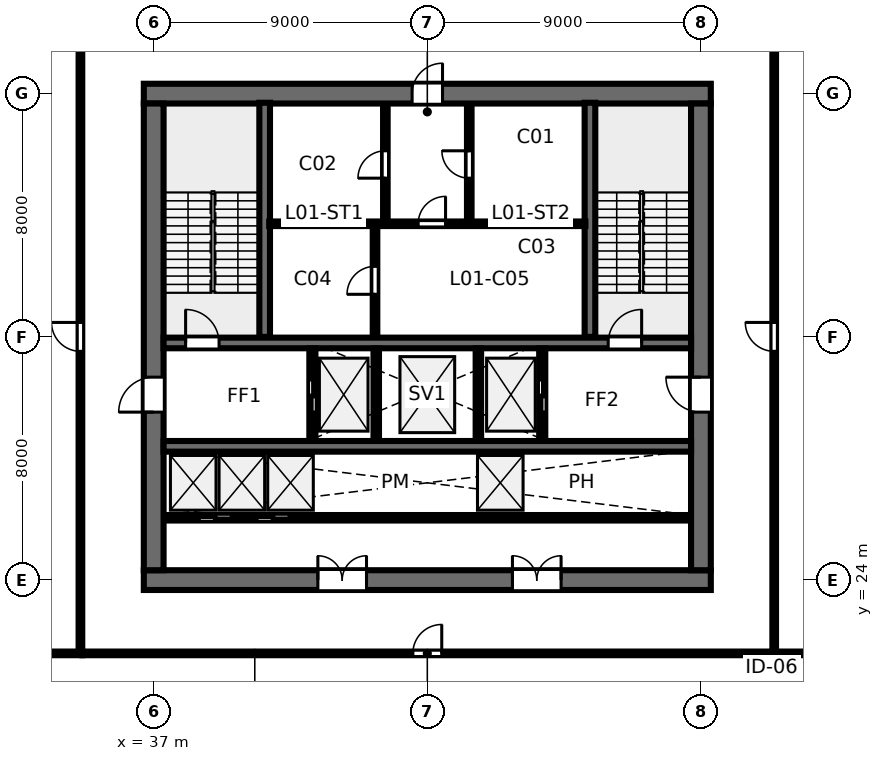
"""IFC4 building model, lengths in metres.
Left out: names, types, materials, properties, quantities, classifications, styles, units other than length and angle.
Written with IfcOpenShell. Run it as: python <this file> out.ifc"""

import sys

from ifc_helpers import new_model, si_unit, direction, frame, frame_2d, origin, place, context, subcontext, project, spatial, rectangle, extrude, element, fill, save


model = new_model("IFC4")
c1 = context("Model", 3, precision=1e-05, world=origin(), true_north=direction((0.0, 1.0)))
c2 = subcontext(c1, "Body", "Model", "MODEL_VIEW")
j1 = project(units=[si_unit("LENGTHUNIT", "METRE"), si_unit("PLANEANGLEUNIT", "RADIAN")], contexts=[c1])
p1 = place(None, origin())
s1 = spatial("IfcSite", under=j1, at=p1, CompositionType="ELEMENT")
p2 = place(p1, origin())
s2 = spatial("IfcBuilding", under=s1, at=p2, CompositionType="ELEMENT")
p3 = place(p2, frame((0.0, 0.0, 5.0)))
s3 = spatial("IfcBuildingStorey", under=s2, at=p3, CompositionType="ELEMENT", Elevation=5.0)
p4 = place(p3, frame((36.675, 24.0, 0.0), z_axis=(0.0, 0.0, 1.0), x_axis=(1.0, 0.0, 0.0)))
e1 = element("IfcWall", 1, at=p4, inside=s3, PredefinedType="SHEAR", context=c2, shape_type="SweptSolid", body=[
    extrude(rectangle(XDim=18.65, YDim=0.65, at=frame_2d((9.325, 0.0))), origin(), (0.0, 0.0, 1.0), 4.22),
])
p5 = place(p4, frame((5.725, 0.0, 0.0)))
e2 = element("IfcOpeningElement", 2, at=p5, cuts=e1, PredefinedType="OPENING", context=c2, shape_type="SweptSolid", body=[
    extrude(rectangle(XDim=1.6, YDim=2.15, at=frame_2d((0.8, 1.075))), frame((0.0, 0.335, 0.0), z_axis=(0.0, -1.0, 0.0), x_axis=(1.0, 0.0, 0.0)), (0.0, 0.0, 1.0), 0.67),
])
p6 = place(p4, frame((12.125, 0.0, 0.0)))
e3 = element("IfcOpeningElement", 3, at=p6, cuts=e1, PredefinedType="OPENING", context=c2, shape_type="SweptSolid", body=[
    extrude(rectangle(XDim=1.6, YDim=2.15, at=frame_2d((0.8, 1.075))), frame((0.0, 0.335, 0.0), z_axis=(0.0, -1.0, 0.0), x_axis=(1.0, 0.0, 0.0)), (0.0, 0.0, 1.0), 0.67),
])
p7 = place(p3, frame((36.675, 40.0, 0.0), z_axis=(0.0, 0.0, 1.0), x_axis=(1.0, 0.0, 0.0)))
e4 = element("IfcWall", 4, at=p7, inside=s3, PredefinedType="SHEAR", context=c2, shape_type="SweptSolid", body=[
    extrude(rectangle(XDim=18.65, YDim=0.65, at=frame_2d((9.325, 0.0))), origin(), (0.0, 0.0, 1.0), 4.22),
])
p8 = place(p7, frame((8.825, 0.0, 0.0)))
e5 = element("IfcOpeningElement", 5, at=p8, cuts=e4, PredefinedType="OPENING", context=c2, shape_type="SweptSolid", body=[
    extrude(rectangle(XDim=1.0, YDim=2.15, at=frame_2d((0.5, 1.075))), frame((0.0, 0.335, 0.0), z_axis=(0.0, -1.0, 0.0), x_axis=(1.0, 0.0, 0.0)), (0.0, 0.0, 1.0), 0.67),
])
p9 = place(p3, frame((37.0, 24.325, 0.0), z_axis=(0.0, 0.0, 1.0), x_axis=(0.0, 1.0, 0.0)))
e6 = element("IfcWall", 6, at=p9, inside=s3, PredefinedType="SHEAR", context=c2, shape_type="SweptSolid", body=[
    extrude(rectangle(XDim=15.35, YDim=0.65, at=frame_2d((7.675, 0.0))), origin(), (0.0, 0.0, 1.0), 4.22),
])
p10 = place(p9, frame((5.2, 0.0, 0.0)))
e7 = element("IfcOpeningElement", 7, at=p10, cuts=e6, PredefinedType="OPENING", context=c2, shape_type="SweptSolid", body=[
    extrude(rectangle(XDim=1.15, YDim=2.15, at=frame_2d((0.575, 1.075))), frame((0.0, 0.335, 0.0), z_axis=(0.0, -1.0, 0.0), x_axis=(1.0, 0.0, 0.0)), (0.0, 0.0, 1.0), 0.67),
])
p11 = place(p3, frame((55.0, 24.325, 0.0), z_axis=(0.0, 0.0, 1.0), x_axis=(0.0, 1.0, 0.0)))
e8 = element("IfcWall", 8, at=p11, inside=s3, PredefinedType="SHEAR", context=c2, shape_type="SweptSolid", body=[
    extrude(rectangle(XDim=15.35, YDim=0.65, at=frame_2d((7.675, 0.0))), origin(), (0.0, 0.0, 1.0), 4.22),
])
p12 = place(p11, frame((5.2, 0.0, 0.0)))
e9 = element("IfcOpeningElement", 9, at=p12, cuts=e8, PredefinedType="OPENING", context=c2, shape_type="SweptSolid", body=[
    extrude(rectangle(XDim=1.15, YDim=2.15, at=frame_2d((0.575, 1.075))), frame((0.0, 0.335, 0.0), z_axis=(0.0, -1.0, 0.0), x_axis=(1.0, 0.0, 0.0)), (0.0, 0.0, 1.0), 0.67),
])
p13 = place(p3, frame((37.325, 31.8, 0.0), z_axis=(0.0, 0.0, 1.0), x_axis=(1.0, 0.0, 0.0)))
e10 = element("IfcWall", 10, at=p13, inside=s3, PredefinedType="SHEAR", context=c2, shape_type="SweptSolid", body=[
    extrude(rectangle(XDim=17.35, YDim=0.35, at=frame_2d((8.675, 0.0))), origin(), (0.0, 0.0, 1.0), 4.22),
])
p14 = place(p13, frame((0.725, 0.0, 0.0)))
e11 = element("IfcOpeningElement", 11, at=p14, cuts=e10, PredefinedType="OPENING", context=c2, shape_type="SweptSolid", body=[
    extrude(rectangle(XDim=1.1, YDim=2.15, at=frame_2d((0.55, 1.075))), frame((0.0, 0.185, 0.0), z_axis=(0.0, -1.0, 0.0), x_axis=(1.0, 0.0, 0.0)), (0.0, 0.0, 1.0), 0.37),
])
p15 = place(p13, frame((14.625, 0.0, 0.0)))
e12 = element("IfcOpeningElement", 12, at=p15, cuts=e10, PredefinedType="OPENING", context=c2, shape_type="SweptSolid", body=[
    extrude(rectangle(XDim=1.1, YDim=2.15, at=frame_2d((0.55, 1.075))), frame((0.0, 0.185, 0.0), z_axis=(0.0, -1.0, 0.0), x_axis=(1.0, 0.0, 0.0)), (0.0, 0.0, 1.0), 0.37),
])
p16 = place(p3, frame((37.325, 28.4, 0.0), z_axis=(0.0, 0.0, 1.0), x_axis=(1.0, 0.0, 0.0)))
e13 = element("IfcWall", 13, at=p16, inside=s3, PredefinedType="SHEAR", context=c2, shape_type="SweptSolid", body=[
    extrude(rectangle(XDim=17.35, YDim=0.35, at=frame_2d((8.675, 0.0))), origin(), (0.0, 0.0, 1.0), 4.22),
])
for number, where, z_axis, x_axis in (
    (14, (40.65, 32.0, 0.0), (0.0, 0.0, 1.0), (0.0, 1.0, 0.0)),
    (15, (51.35, 32.0, 0.0), (0.0, 0.0, 1.0), (0.0, 1.0, 0.0)),
):
    element("IfcWall", number, at=place(p3, frame(where, z_axis=z_axis, x_axis=x_axis)), inside=s3, PredefinedType="SHEAR", context=c2, shape_type="SweptSolid", body=[
        extrude(rectangle(XDim=7.7, YDim=0.35, at=frame_2d((3.85, 0.0))), origin(), (0.0, 0.0, 1.0), 4.5),
    ])
p17 = place(p3, frame((44.62, 35.72, 0.0), z_axis=(0.0, 0.0, 1.0), x_axis=(0.0, 1.0, 0.0)))
e16 = element("IfcWall", 16, at=p17, inside=s3, PredefinedType="PARTITIONING", context=c2, shape_type="SweptSolid", body=[
    extrude(rectangle(XDim=3.93, YDim=0.15, at=frame_2d((1.965, 0.0))), origin(), (0.0, 0.0, 1.0), 4.22),
])
p18 = place(p17, frame((1.5, 0.0, 0.0)))
e17 = element("IfcOpeningElement", 17, at=p18, cuts=e16, PredefinedType="OPENING", context=c2, shape_type="SweptSolid", body=[
    extrude(rectangle(XDim=0.9, YDim=2.15, at=frame_2d((0.45, 1.075))), frame((0.0, 0.085, 0.0), z_axis=(0.0, -1.0, 0.0), x_axis=(1.0, 0.0, 0.0)), (0.0, 0.0, 1.0), 0.17),
])
p19 = place(p3, frame((47.38, 35.72, 0.0), z_axis=(0.0, 0.0, 1.0), x_axis=(0.0, 1.0, 0.0)))
e18 = element("IfcWall", 18, at=p19, inside=s3, PredefinedType="PARTITIONING", context=c2, shape_type="SweptSolid", body=[
    extrude(rectangle(XDim=3.93, YDim=0.15, at=frame_2d((1.965, 0.0))), origin(), (0.0, 0.0, 1.0), 4.22),
])
p20 = place(p19, frame((1.5, 0.0, 0.0)))
e19 = element("IfcOpeningElement", 19, at=p20, cuts=e18, PredefinedType="OPENING", context=c2, shape_type="SweptSolid", body=[
    extrude(rectangle(XDim=0.9, YDim=2.15, at=frame_2d((0.45, 1.075))), frame((0.0, 0.085, 0.0), z_axis=(0.0, -1.0, 0.0), x_axis=(1.0, 0.0, 0.0)), (0.0, 0.0, 1.0), 0.17),
])
p21 = place(p3, frame((44.28, 32.05, 0.0), z_axis=(0.0, 0.0, 1.0), x_axis=(0.0, 1.0, 0.0)))
e20 = element("IfcWall", 20, at=p21, inside=s3, PredefinedType="PARTITIONING", context=c2, shape_type="SweptSolid", body=[
    extrude(rectangle(XDim=3.67, YDim=0.15, at=frame_2d((1.835, 0.0))), origin(), (0.0, 0.0, 1.0), 4.22),
])
p22 = place(p21, frame((1.35, 0.0, 0.0)))
e21 = element("IfcOpeningElement", 21, at=p22, cuts=e20, PredefinedType="OPENING", context=c2, shape_type="SweptSolid", body=[
    extrude(rectangle(XDim=0.92, YDim=2.15, at=frame_2d((0.46, 1.075))), frame((0.0, 0.085, 0.0), z_axis=(0.0, -1.0, 0.0), x_axis=(1.0, 0.0, 0.0)), (0.0, 0.0, 1.0), 0.17),
])
p23 = place(p3, frame((40.8, 35.72, 0.0), z_axis=(0.0, 0.0, 1.0), x_axis=(1.0, 0.0, 0.0)))
e22 = element("IfcWall", 22, at=p23, inside=s3, PredefinedType="PARTITIONING", context=c2, shape_type="SweptSolid", body=[
    extrude(rectangle(XDim=10.4, YDim=0.15, at=frame_2d((5.2, 0.0))), origin(), (0.0, 0.0, 1.0), 4.22),
])
p24 = place(p23, frame((4.9, 0.0, 0.0)))
e23 = element("IfcOpeningElement", 23, at=p24, cuts=e22, PredefinedType="OPENING", context=c2, shape_type="SweptSolid", body=[
    extrude(rectangle(XDim=0.9, YDim=2.15, at=frame_2d((0.45, 1.075))), frame((0.0, 0.085, 0.0), z_axis=(0.0, -1.0, 0.0), x_axis=(1.0, 0.0, 0.0)), (0.0, 0.0, 1.0), 0.17),
])
p25 = place(p3, frame((42.22, 28.58, 0.0), z_axis=(0.0, 0.0, 1.0), x_axis=(0.0, 1.0, 0.0)))
e24 = element("IfcWall", 24, at=p25, inside=s3, PredefinedType="PARTITIONING", context=c2, shape_type="SweptSolid", body=[
    extrude(rectangle(XDim=3.04, YDim=0.2, at=frame_2d((1.52, 0.0))), origin(), (0.0, 0.0, 1.0), 4.22),
])
p26 = place(p25, frame((0.95, 0.0, 0.0)))
e25 = element("IfcOpeningElement", 25, at=p26, cuts=e24, PredefinedType="OPENING", context=c2, shape_type="SweptSolid", body=[
    extrude(rectangle(XDim=1.05, YDim=2.15, at=frame_2d((0.525, 1.075))), frame((0.0, 0.11, 0.0), z_axis=(0.0, -1.0, 0.0), x_axis=(1.0, 0.0, 0.0)), (0.0, 0.0, 1.0), 0.22),
])
p27 = place(p3, frame((49.78, 28.58, 0.0), z_axis=(0.0, 0.0, 1.0), x_axis=(0.0, 1.0, 0.0)))
e26 = element("IfcWall", 26, at=p27, inside=s3, PredefinedType="PARTITIONING", context=c2, shape_type="SweptSolid", body=[
    extrude(rectangle(XDim=3.04, YDim=0.2, at=frame_2d((1.52, 0.0))), origin(), (0.0, 0.0, 1.0), 4.22),
])
p28 = place(p27, frame((0.95, 0.0, 0.0)))
e27 = element("IfcOpeningElement", 27, at=p28, cuts=e26, PredefinedType="OPENING", context=c2, shape_type="SweptSolid", body=[
    extrude(rectangle(XDim=1.05, YDim=2.15, at=frame_2d((0.525, 1.075))), frame((0.0, 0.11, 0.0), z_axis=(0.0, -1.0, 0.0), x_axis=(1.0, 0.0, 0.0)), (0.0, 0.0, 1.0), 0.22),
])
for number, where, z_axis, x_axis in (
    (28, (44.32, 28.58, 0.0), (0.0, 0.0, 1.0), (0.0, 1.0, 0.0)),
    (29, (47.68, 28.58, 0.0), (0.0, 0.0, 1.0), (0.0, 1.0, 0.0)),
):
    element("IfcWall", number, at=place(p3, frame(where, z_axis=z_axis, x_axis=x_axis)), inside=s3, PredefinedType="PARTITIONING", context=c2, shape_type="SweptSolid", body=[
        extrude(rectangle(XDim=3.04, YDim=0.18, at=frame_2d((1.52, 0.0))), origin(), (0.0, 0.0, 1.0), 4.22),
    ])
p29 = place(p3, frame((37.4, 26.05, 0.0), z_axis=(0.0, 0.0, 1.0), x_axis=(1.0, 0.0, 0.0)))
e30 = element("IfcWall", 30, at=p29, inside=s3, PredefinedType="PARTITIONING", context=c2, shape_type="SweptSolid", body=[
    extrude(rectangle(XDim=17.2, YDim=0.18, at=frame_2d((8.6, 0.0))), origin(), (0.0, 0.0, 1.0), 4.22),
])
p30 = place(p29, frame((1.1, 0.0, 0.0)))
e31 = element("IfcOpeningElement", 31, at=p30, cuts=e30, PredefinedType="OPENING", context=c2, shape_type="SweptSolid", body=[
    extrude(rectangle(XDim=1.05, YDim=2.15, at=frame_2d((0.525, 1.075))), frame((0.0, 0.1, 0.0), z_axis=(0.0, -1.0, 0.0), x_axis=(1.0, 0.0, 0.0)), (0.0, 0.0, 1.0), 0.2),
])
p31 = place(p29, frame((3.0, 0.0, 0.0)))
e32 = element("IfcOpeningElement", 32, at=p31, cuts=e30, PredefinedType="OPENING", context=c2, shape_type="SweptSolid", body=[
    extrude(rectangle(XDim=1.05, YDim=2.15, at=frame_2d((0.525, 1.075))), frame((0.0, 0.1, 0.0), z_axis=(0.0, -1.0, 0.0), x_axis=(1.0, 0.0, 0.0)), (0.0, 0.0, 1.0), 0.2),
])
p32 = place(p3, frame((57.326, 21.59, 0.0), z_axis=(0.0, 0.0, 1.0), x_axis=(0.0, -1.0, 0.0)))
e33 = element("IfcWall", 33, at=p32, inside=s3, PredefinedType="MOVABLE", context=c2, shape_type="SweptSolid", body=[
    extrude(rectangle(XDim=17.25, YDim=0.12, at=frame_2d((8.625, 0.0))), origin(), (0.0, 0.0, 1.0), 3.32),
])
p33 = place(p32, frame((1.4, 0.0, 0.0)))
e34 = element("IfcOpeningElement", 34, at=p33, cuts=e33, PredefinedType="OPENING", context=c2, shape_type="SweptSolid", body=[
    extrude(rectangle(XDim=0.9, YDim=2.15, at=frame_2d((0.45, 1.075))), frame((0.0, 0.07, 0.0), z_axis=(0.0, -1.0, 0.0), x_axis=(1.0, 0.0, 0.0)), (0.0, 0.0, 1.0), 0.14),
])
p34 = place(p3, frame((34.65, 21.59, 0.0), z_axis=(0.0, 0.0, 1.0), x_axis=(1.0, 0.0, 0.0)))
e35 = element("IfcWall", 35, at=p34, inside=s3, PredefinedType="PARTITIONING", context=c2, shape_type="SweptSolid", body=[
    extrude(rectangle(XDim=22.7, YDim=0.12, at=frame_2d((11.35, 0.0))), origin(), (0.0, 0.0, 1.0), 3.32),
])
p35 = place(p34, frame((10.875, 0.0, 0.0)))
e36 = element("IfcOpeningElement", 36, at=p35, cuts=e35, PredefinedType="OPENING", context=c2, shape_type="SweptSolid", body=[
    extrude(rectangle(XDim=0.95, YDim=2.15, at=frame_2d((0.475, 1.075))), frame((0.0, 0.07, 0.0), z_axis=(0.0, -1.0, 0.0), x_axis=(1.0, 0.0, 0.0)), (0.0, 0.0, 1.0), 0.14),
])
p36 = place(p3, frame((34.59, 21.65, 0.0), z_axis=(0.0, 0.0, 1.0), x_axis=(0.0, 1.0, 0.0)))
e37 = element("IfcWall", 37, at=p36, inside=s3, PredefinedType="PARTITIONING", context=c2, shape_type="SweptSolid", body=[
    extrude(rectangle(XDim=20.7, YDim=0.12, at=frame_2d((10.35, 0.0))), origin(), (0.0, 0.0, 1.0), 3.32),
])
p37 = place(p36, frame((9.875, 0.0, 0.0)))
e38 = element("IfcOpeningElement", 38, at=p37, cuts=e37, PredefinedType="OPENING", context=c2, shape_type="SweptSolid", body=[
    extrude(rectangle(XDim=0.95, YDim=2.15, at=frame_2d((0.475, 1.075))), frame((0.0, 0.07, 0.0), z_axis=(0.0, -1.0, 0.0), x_axis=(1.0, 0.0, 0.0)), (0.0, 0.0, 1.0), 0.14),
])
p38 = place(p3, frame((57.41, 21.65, 0.0), z_axis=(0.0, 0.0, 1.0), x_axis=(0.0, 1.0, 0.0)))
e39 = element("IfcWall", 39, at=p38, inside=s3, PredefinedType="PARTITIONING", context=c2, shape_type="SweptSolid", body=[
    extrude(rectangle(XDim=20.7, YDim=0.12, at=frame_2d((10.35, 0.0))), origin(), (0.0, 0.0, 1.0), 3.32),
])
p39 = place(p38, frame((9.875, 0.0, 0.0)))
e40 = element("IfcOpeningElement", 40, at=p39, cuts=e39, PredefinedType="OPENING", context=c2, shape_type="SweptSolid", body=[
    extrude(rectangle(XDim=0.95, YDim=2.15, at=frame_2d((0.475, 1.075))), frame((0.0, 0.07, 0.0), z_axis=(0.0, -1.0, 0.0), x_axis=(1.0, 0.0, 0.0)), (0.0, 0.0, 1.0), 0.14),
])
for number, where, z_axis, x_axis in (
    (41, (34.65, 21.59, 0.0), (0.0, 0.0, 1.0), (-1.0, 0.0, 0.0)),
    (42, (57.35, 21.59, 0.0), (0.0, 0.0, 1.0), (1.0, 0.0, 0.0)),
):
    element("IfcWall", number, at=place(p3, frame(where, z_axis=z_axis, x_axis=x_axis)), inside=s3, PredefinedType="PARTITIONING", context=c2, shape_type="SweptSolid", body=[
        extrude(rectangle(XDim=29.01, YDim=0.12, at=frame_2d((14.505, 0.0))), origin(), (0.0, 0.0, 1.0), 3.32),
    ])
p40 = place(p14, origin())
e43 = element("IfcDoor", 43, at=p40, inside=s3, OperationType="SINGLE_SWING_LEFT", PredefinedType="DOOR", context=c2, shape_type="SweptSolid", body=[
    extrude(rectangle(XDim=1.1, YDim=2.15, at=frame_2d((0.55, 1.075))), frame((0.0, 0.025, 0.0), z_axis=(0.0, -1.0, 0.0), x_axis=(1.0, 0.0, 0.0)), (0.0, 0.0, 1.0), 0.05),
])
fill(e11, e43)
p41 = place(p15, origin())
e44 = element("IfcDoor", 44, at=p41, inside=s3, OperationType="SINGLE_SWING_RIGHT", PredefinedType="DOOR", context=c2, shape_type="SweptSolid", body=[
    extrude(rectangle(XDim=1.1, YDim=2.15, at=frame_2d((0.55, 1.075))), frame((0.0, 0.025, 0.0), z_axis=(0.0, -1.0, 0.0), x_axis=(1.0, 0.0, 0.0)), (0.0, 0.0, 1.0), 0.05),
])
fill(e12, e44)
p42 = place(p8, origin())
e45 = element("IfcDoor", 45, at=p42, inside=s3, OperationType="SINGLE_SWING_RIGHT", PredefinedType="DOOR", context=c2, shape_type="SweptSolid", body=[
    extrude(rectangle(XDim=1.0, YDim=2.15, at=frame_2d((0.5, 1.075))), frame((0.0, 0.025, 0.0), z_axis=(0.0, -1.0, 0.0), x_axis=(1.0, 0.0, 0.0)), (0.0, 0.0, 1.0), 0.05),
])
fill(e5, e45)
p43 = place(p10, origin())
e46 = element("IfcDoor", 46, at=p43, inside=s3, OperationType="SINGLE_SWING_LEFT", PredefinedType="DOOR", context=c2, shape_type="SweptSolid", body=[
    extrude(rectangle(XDim=1.15, YDim=2.15, at=frame_2d((0.575, 1.075))), frame((0.0, 0.025, 0.0), z_axis=(0.0, -1.0, 0.0), x_axis=(1.0, 0.0, 0.0)), (0.0, 0.0, 1.0), 0.05),
])
fill(e7, e46)
p44 = place(p12, origin())
e47 = element("IfcDoor", 47, at=p44, inside=s3, OperationType="SINGLE_SWING_RIGHT", PredefinedType="DOOR", context=c2, shape_type="SweptSolid", body=[
    extrude(rectangle(XDim=1.15, YDim=2.15, at=frame_2d((0.575, 1.075))), frame((0.0, 0.025, 0.0), z_axis=(0.0, -1.0, 0.0), x_axis=(1.0, 0.0, 0.0)), (0.0, 0.0, 1.0), 0.05),
])
fill(e9, e47)
p45 = place(p5, origin())
e48 = element("IfcDoor", 48, at=p45, inside=s3, OperationType="DOUBLE_DOOR_SINGLE_SWING", PredefinedType="DOOR", context=c2, shape_type="SweptSolid", body=[
    extrude(rectangle(XDim=1.6, YDim=2.15, at=frame_2d((0.8, 1.075))), frame((0.0, 0.025, 0.0), z_axis=(0.0, -1.0, 0.0), x_axis=(1.0, 0.0, 0.0)), (0.0, 0.0, 1.0), 0.05),
])
fill(e2, e48)
p46 = place(p6, origin())
e49 = element("IfcDoor", 49, at=p46, inside=s3, OperationType="DOUBLE_DOOR_SINGLE_SWING", PredefinedType="DOOR", context=c2, shape_type="SweptSolid", body=[
    extrude(rectangle(XDim=1.6, YDim=2.15, at=frame_2d((0.8, 1.075))), frame((0.0, 0.025, 0.0), z_axis=(0.0, -1.0, 0.0), x_axis=(1.0, 0.0, 0.0)), (0.0, 0.0, 1.0), 0.05),
])
fill(e3, e49)
p47 = place(p18, origin())
e50 = element("IfcDoor", 50, at=p47, inside=s3, OperationType="SINGLE_SWING_LEFT", PredefinedType="DOOR", context=c2, shape_type="SweptSolid", body=[
    extrude(rectangle(XDim=0.9, YDim=2.15, at=frame_2d((0.45, 1.075))), frame((0.0, 0.025, 0.0), z_axis=(0.0, -1.0, 0.0), x_axis=(1.0, 0.0, 0.0)), (0.0, 0.0, 1.0), 0.05),
])
fill(e17, e50)
p48 = place(p20, origin())
e51 = element("IfcDoor", 51, at=p48, inside=s3, OperationType="SINGLE_SWING_RIGHT", PredefinedType="DOOR", context=c2, shape_type="SweptSolid", body=[
    extrude(rectangle(XDim=0.9, YDim=2.15, at=frame_2d((0.45, 1.075))), frame((0.0, 0.025, 0.0), z_axis=(0.0, -1.0, 0.0), x_axis=(1.0, 0.0, 0.0)), (0.0, 0.0, 1.0), 0.05),
])
fill(e19, e51)
p49 = place(p22, origin())
e52 = element("IfcDoor", 52, at=p49, inside=s3, OperationType="SINGLE_SWING_LEFT", PredefinedType="DOOR", context=c2, shape_type="SweptSolid", body=[
    extrude(rectangle(XDim=0.92, YDim=2.15, at=frame_2d((0.46, 1.075))), frame((0.0, 0.025, 0.0), z_axis=(0.0, -1.0, 0.0), x_axis=(1.0, 0.0, 0.0)), (0.0, 0.0, 1.0), 0.05),
])
fill(e21, e52)
p50 = place(p24, origin())
e53 = element("IfcDoor", 53, at=p50, inside=s3, OperationType="SINGLE_SWING_RIGHT", PredefinedType="DOOR", context=c2, shape_type="SweptSolid", body=[
    extrude(rectangle(XDim=0.9, YDim=2.15, at=frame_2d((0.45, 1.075))), frame((0.0, 0.025, 0.0), z_axis=(0.0, -1.0, 0.0), x_axis=(1.0, 0.0, 0.0)), (0.0, 0.0, 1.0), 0.05),
])
fill(e23, e53)
p51 = place(p26, origin())
e54 = element("IfcDoor", 54, at=p51, inside=s3, OperationType="SLIDING_TO_LEFT", PredefinedType="DOOR", context=c2, shape_type="SweptSolid", body=[
    extrude(rectangle(XDim=1.05, YDim=2.15, at=frame_2d((0.525, 1.075))), frame((0.0, 0.025, 0.0), z_axis=(0.0, -1.0, 0.0), x_axis=(1.0, 0.0, 0.0)), (0.0, 0.0, 1.0), 0.05),
])
fill(e25, e54)
p52 = place(p28, origin())
e55 = element("IfcDoor", 55, at=p52, inside=s3, OperationType="SLIDING_TO_RIGHT", PredefinedType="DOOR", context=c2, shape_type="SweptSolid", body=[
    extrude(rectangle(XDim=1.05, YDim=2.15, at=frame_2d((0.525, 1.075))), frame((0.0, 0.025, 0.0), z_axis=(0.0, -1.0, 0.0), x_axis=(1.0, 0.0, 0.0)), (0.0, 0.0, 1.0), 0.05),
])
fill(e27, e55)
p53 = place(p30, origin())
e56 = element("IfcDoor", 56, at=p53, inside=s3, OperationType="SLIDING_TO_LEFT", PredefinedType="DOOR", context=c2, shape_type="SweptSolid", body=[
    extrude(rectangle(XDim=1.05, YDim=2.15, at=frame_2d((0.525, 1.075))), frame((0.0, 0.025, 0.0), z_axis=(0.0, -1.0, 0.0), x_axis=(1.0, 0.0, 0.0)), (0.0, 0.0, 1.0), 0.05),
])
fill(e31, e56)
p54 = place(p31, origin())
e57 = element("IfcDoor", 57, at=p54, inside=s3, OperationType="SLIDING_TO_RIGHT", PredefinedType="DOOR", context=c2, shape_type="SweptSolid", body=[
    extrude(rectangle(XDim=1.05, YDim=2.15, at=frame_2d((0.525, 1.075))), frame((0.0, 0.025, 0.0), z_axis=(0.0, -1.0, 0.0), x_axis=(1.0, 0.0, 0.0)), (0.0, 0.0, 1.0), 0.05),
])
fill(e32, e57)
p55 = place(p35, origin())
e58 = element("IfcDoor", 58, at=p55, inside=s3, OperationType="SINGLE_SWING_RIGHT", PredefinedType="DOOR", context=c2, shape_type="SweptSolid", body=[
    extrude(rectangle(XDim=0.95, YDim=2.15, at=frame_2d((0.475, 1.075))), frame((0.0, 0.025, 0.0), z_axis=(0.0, -1.0, 0.0), x_axis=(1.0, 0.0, 0.0)), (0.0, 0.0, 1.0), 0.05),
])
fill(e36, e58)
p56 = place(p37, origin())
e59 = element("IfcDoor", 59, at=p56, inside=s3, OperationType="SINGLE_SWING_RIGHT", PredefinedType="DOOR", context=c2, shape_type="SweptSolid", body=[
    extrude(rectangle(XDim=0.95, YDim=2.15, at=frame_2d((0.475, 1.075))), frame((0.0, 0.025, 0.0), z_axis=(0.0, -1.0, 0.0), x_axis=(1.0, 0.0, 0.0)), (0.0, 0.0, 1.0), 0.05),
])
fill(e38, e59)
p57 = place(p39, origin())
e60 = element("IfcDoor", 60, at=p57, inside=s3, OperationType="SINGLE_SWING_RIGHT", PredefinedType="DOOR", context=c2, shape_type="SweptSolid", body=[
    extrude(rectangle(XDim=0.95, YDim=2.15, at=frame_2d((0.475, 1.075))), frame((0.0, 0.025, 0.0), z_axis=(0.0, -1.0, 0.0), x_axis=(1.0, 0.0, 0.0)), (0.0, 0.0, 1.0), 0.05),
])
fill(e40, e60)
save(model, sys.argv[1])
